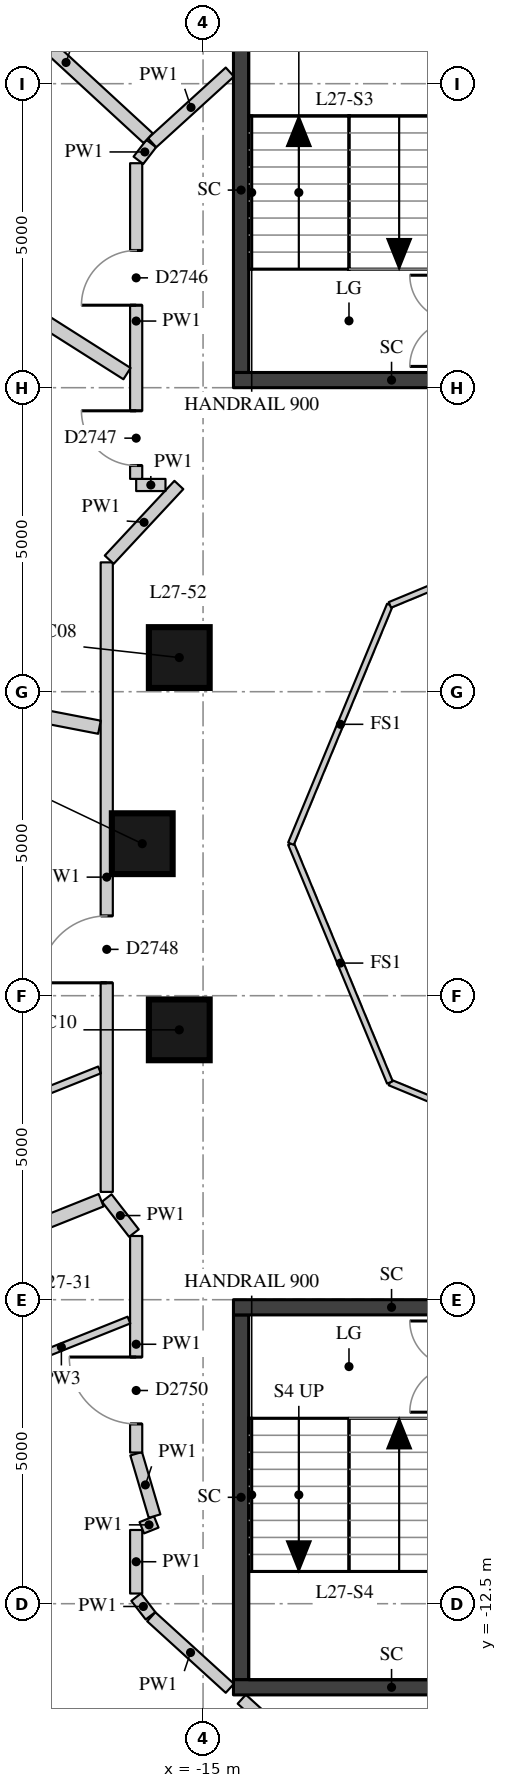
"""IFC4 building model, lengths in metres.
Left out: names, types, materials, properties, quantities, classifications, styles, units other than length and angle.
Written with IfcOpenShell. Run it as: python <this file> out.ifc"""

import sys

from ifc_helpers import new_model, si_unit, direction, frame, frame_2d, origin, origin_2d, place, context, subcontext, project, spatial, rectangle, extrude, element, fill, save


model = new_model("IFC4")
c1 = context("Model", 3, precision=1e-05, world=origin(), true_north=direction((0.0, 1.0)))
c2 = subcontext(c1, "Body", "Model", "MODEL_VIEW")
j1 = project(units=[si_unit("LENGTHUNIT", "METRE"), si_unit("PLANEANGLEUNIT", "RADIAN")], contexts=[c1])
p1 = place(None, origin())
s1 = spatial("IfcSite", under=j1, at=p1, CompositionType="ELEMENT")
p2 = place(p1, origin())
s2 = spatial("IfcBuilding", under=s1, at=p2, CompositionType="ELEMENT")
p3 = place(p2, frame((0.0, 0.0, 98.8)))
s3 = spatial("IfcBuildingStorey", under=s2, at=p3, CompositionType="ELEMENT", Elevation=98.8)
for number, where, z_axis, x_axis in (
    (1, (-15.391, 3.062, 0.0), (0.0, 0.0, 1.0), (1.0, 0.0, 0.0)),
    (2, (-16.0, 0.0, 0.0), (0.0, 0.0, 1.0), (1.0, 0.0, 0.0)),
    (3, (-15.391, -3.062, 0.0), (0.0, 0.0, 1.0), (1.0, 0.0, 0.0)),
):
    element("IfcColumn", number, at=place(p3, frame(where, z_axis=z_axis, x_axis=x_axis)), inside=s3, PredefinedType="COLUMN", context=c2, shape_type="SweptSolid", body=[
        extrude(rectangle(XDim=1.0, YDim=1.0, at=origin_2d()), origin(), (0.0, 0.0, 1.0), 3.3),
    ])
p4 = place(p3, frame((-14.375, 7.75, -0.28), z_axis=(0.0, 0.0, 1.0), x_axis=(0.0, 1.0, 0.0)))
e4 = element("IfcWall", 4, at=p4, inside=s3, PredefinedType="SHEAR", context=c2, shape_type="SweptSolid", body=[
    extrude(rectangle(XDim=6.0, YDim=0.25, at=frame_2d((3.0, 0.0))), origin(), (0.0, 0.0, 1.0), 3.3),
])
p5 = place(p3, frame((-14.5, 7.625, -0.28), z_axis=(0.0, 0.0, 1.0), x_axis=(1.0, 0.0, 0.0)))
e5 = element("IfcWall", 5, at=p5, inside=s3, PredefinedType="SHEAR", context=c2, shape_type="SweptSolid", body=[
    extrude(rectangle(XDim=5.2, YDim=0.25, at=frame_2d((2.6, 0.0))), origin(), (0.0, 0.0, 1.0), 3.3),
])
p6 = place(p3, frame((-14.375, -13.75, -0.28), z_axis=(0.0, 0.0, 1.0), x_axis=(0.0, 1.0, 0.0)))
e6 = element("IfcWall", 6, at=p6, inside=s3, PredefinedType="SHEAR", context=c2, shape_type="SweptSolid", body=[
    extrude(rectangle(XDim=6.0, YDim=0.25, at=frame_2d((3.0, 0.0))), origin(), (0.0, 0.0, 1.0), 3.3),
])
for number, where, z_axis, x_axis in (
    (7, (-14.5, -7.625, -0.28), (0.0, 0.0, 1.0), (1.0, 0.0, 0.0)),
    (8, (-14.5, -13.875, -0.28), (0.0, 0.0, 1.0), (1.0, 0.0, 0.0)),
):
    element("IfcWall", number, at=place(p3, frame(where, z_axis=z_axis, x_axis=x_axis)), inside=s3, PredefinedType="SHEAR", context=c2, shape_type="SweptSolid", body=[
        extrude(rectangle(XDim=5.2, YDim=0.25, at=frame_2d((2.6, 0.0))), origin(), (0.0, 0.0, 1.0), 3.3),
    ])
p7 = place(p3, frame((-14.56, -13.891, 0.0), z_axis=(0.0, 0.0, 1.0), x_axis=(-0.739440483737, 0.673221932954, 0.0)))
e9 = element("IfcWall", 9, at=p7, inside=s3, PredefinedType="PARTITIONING", context=c2, shape_type="SweptSolid", body=[
    extrude(rectangle(XDim=1.748, YDim=0.2, at=frame_2d((0.874, 0.0))), origin(), (0.0, 0.0, 1.0), 3.02),
])
p8 = place(p3, frame((-15.864, -12.699, 0.0), z_axis=(0.0, 0.0, 1.0), x_axis=(-0.61004607296, 0.792365943782, 0.0)))
e10 = element("IfcWall", 10, at=p8, inside=s3, PredefinedType="PARTITIONING", context=c2, shape_type="SweptSolid", body=[
    extrude(rectangle(XDim=0.387, YDim=0.2, at=frame_2d((0.193, 0.0))), origin(), (0.0, 0.0, 1.0), 3.02),
])
p9 = place(p3, frame((-16.1, -12.332, 0.0), z_axis=(0.0, 0.0, 1.0), x_axis=(0.0, 1.0, 0.0)))
e11 = element("IfcWall", 11, at=p9, inside=s3, PredefinedType="PARTITIONING", context=c2, shape_type="SweptSolid", body=[
    extrude(rectangle(XDim=1.045, YDim=0.2, at=frame_2d((0.522, 0.0))), origin(), (0.0, 0.0, 1.0), 3.02),
])
p10 = place(p3, frame((-16.007, -11.251, 0.0), z_axis=(0.0, 0.0, 1.0), x_axis=(0.928016011931, 0.372540308691, 0.0)))
e12 = element("IfcWall", 12, at=p10, inside=s3, PredefinedType="PARTITIONING", context=c2, shape_type="SweptSolid", body=[
    extrude(rectangle(XDim=0.256, YDim=0.2, at=frame_2d((0.128, 0.0))), origin(), (0.0, 0.0, 1.0), 3.02),
])
p11 = place(p3, frame((-15.798, -11.059, 0.0), z_axis=(0.0, 0.0, 1.0), x_axis=(-0.282883185669, 0.959154368841, 0.0)))
e13 = element("IfcWall", 13, at=p11, inside=s3, PredefinedType="PARTITIONING", context=c2, shape_type="SweptSolid", body=[
    extrude(rectangle(XDim=1.069, YDim=0.2, at=frame_2d((0.535, 0.0))), origin(), (0.0, 0.0, 1.0), 3.02),
])
p12 = place(p3, frame((-16.1, -10.013, 0.0), z_axis=(0.0, 0.0, 1.0), x_axis=(0.0, 1.0, 0.0)))
e14 = element("IfcWall", 14, at=p12, inside=s3, PredefinedType="PARTITIONING", context=c2, shape_type="SweptSolid", body=[
    extrude(rectangle(XDim=3.561, YDim=0.2, at=frame_2d((1.781, 0.0))), origin(), (0.0, 0.0, 1.0), 3.02),
])
p13 = place(p12, frame((0.47, 0.0, 0.0)))
e15 = element("IfcOpeningElement", 15, at=p13, cuts=e14, PredefinedType="OPENING", context=c2, shape_type="SweptSolid", body=[
    extrude(rectangle(XDim=1.1, YDim=2.1, at=frame_2d((0.55, 1.05))), frame((0.0, 0.11, 0.0), z_axis=(0.0, -1.0, 0.0), x_axis=(1.0, 0.0, 0.0)), (0.0, 0.0, 1.0), 0.22),
])
p14 = place(p3, frame((-16.137, -6.405, 0.0), z_axis=(0.0, 0.0, 1.0), x_axis=(-0.612388914667, 0.790556650211, 0.0)))
e16 = element("IfcWall", 16, at=p14, inside=s3, PredefinedType="PARTITIONING", context=c2, shape_type="SweptSolid", body=[
    extrude(rectangle(XDim=0.73, YDim=0.2, at=frame_2d((0.365, 0.0))), origin(), (0.0, 0.0, 1.0), 3.02),
])
p15 = place(p3, frame((-16.584, -5.727, 0.0), z_axis=(0.0, 0.0, 1.0), x_axis=(0.0, 1.0, 0.0)))
e17 = element("IfcWall", 17, at=p15, inside=s3, PredefinedType="PARTITIONING", context=c2, shape_type="SweptSolid", body=[
    extrude(rectangle(XDim=10.354, YDim=0.2, at=frame_2d((5.177, 0.0))), origin(), (0.0, 0.0, 1.0), 3.02),
])
p16 = place(p15, frame((3.439, 0.0, 0.0)))
e18 = element("IfcOpeningElement", 18, at=p16, cuts=e17, PredefinedType="OPENING", context=c2, shape_type="SweptSolid", body=[
    extrude(rectangle(XDim=1.1, YDim=2.1, at=frame_2d((0.55, 1.05))), frame((0.0, 0.11, 0.0), z_axis=(0.0, -1.0, 0.0), x_axis=(1.0, 0.0, 0.0)), (0.0, 0.0, 1.0), 0.22),
])
p17 = place(p3, frame((-16.543, 4.671, 0.0), z_axis=(0.0, 0.0, 1.0), x_axis=(0.681815766934, 0.731523929861, 0.0)))
e19 = element("IfcWall", 19, at=p17, inside=s3, PredefinedType="PARTITIONING", context=c2, shape_type="SweptSolid", body=[
    extrude(rectangle(XDim=1.68, YDim=0.2, at=frame_2d((0.84, 0.0))), origin(), (0.0, 0.0, 1.0), 3.02),
])
p18 = place(p3, frame((-15.618, 5.9, 0.0), z_axis=(0.0, 0.0, 1.0), x_axis=(-1.0, 0.0, 0.0)))
e20 = element("IfcWall", 20, at=p18, inside=s3, PredefinedType="PARTITIONING", context=c2, shape_type="SweptSolid", body=[
    extrude(rectangle(XDim=0.482, YDim=0.2, at=frame_2d((0.241, 0.0))), origin(), (0.0, 0.0, 1.0), 3.02),
])
p19 = place(p3, frame((-16.1, 6.0, 0.0), z_axis=(0.0, 0.0, 1.0), x_axis=(0.0, 1.0, 0.0)))
e21 = element("IfcWall", 21, at=p19, inside=s3, PredefinedType="PARTITIONING", context=c2, shape_type="SweptSolid", body=[
    extrude(rectangle(XDim=5.192, YDim=0.2, at=frame_2d((2.596, 0.0))), origin(), (0.0, 0.0, 1.0), 3.02),
])
p20 = place(p19, frame((2.857, 0.0, 0.0)))
e22 = element("IfcOpeningElement", 22, at=p20, cuts=e21, PredefinedType="OPENING", context=c2, shape_type="SweptSolid", body=[
    extrude(rectangle(XDim=0.9, YDim=2.1, at=frame_2d((0.45, 1.05))), frame((0.0, 0.11, 0.0), z_axis=(0.0, -1.0, 0.0), x_axis=(1.0, 0.0, 0.0)), (0.0, 0.0, 1.0), 0.22),
])
p21 = place(p19, frame((0.22, 0.0, 0.0)))
e23 = element("IfcOpeningElement", 23, at=p21, cuts=e21, PredefinedType="OPENING", context=c2, shape_type="SweptSolid", body=[
    extrude(rectangle(XDim=0.9, YDim=2.1, at=frame_2d((0.45, 1.05))), frame((0.0, 0.11, 0.0), z_axis=(0.0, -1.0, 0.0), x_axis=(1.0, 0.0, 0.0)), (0.0, 0.0, 1.0), 0.22),
])
p22 = place(p3, frame((-16.063, 11.24, 0.0), z_axis=(0.0, 0.0, 1.0), x_axis=(0.609744747854, 0.792597844096, 0.0)))
e24 = element("IfcWall", 24, at=p22, inside=s3, PredefinedType="PARTITIONING", context=c2, shape_type="SweptSolid", body=[
    extrude(rectangle(XDim=0.347, YDim=0.2, at=frame_2d((0.174, 0.0))), origin(), (0.0, 0.0, 1.0), 3.02),
])
p23 = place(p3, frame((-15.837, 11.528, 0.0), z_axis=(0.0, 0.0, 1.0), x_axis=(0.739402681643, 0.673263450946, 0.0)))
e25 = element("IfcWall", 25, at=p23, inside=s3, PredefinedType="PARTITIONING", context=c2, shape_type="SweptSolid", body=[
    extrude(rectangle(XDim=1.728, YDim=0.2, at=frame_2d((0.864, 0.0))), origin(), (0.0, 0.0, 1.0), 3.02),
])
p24 = place(p3, frame((-13.24, -15.093, 0.0), z_axis=(0.0, 0.0, 1.0), x_axis=(-0.739438095557, 0.673224556028, 0.0)))
e26 = element("IfcWall", 26, at=p24, inside=s3, PredefinedType="PARTITIONING", context=c2, shape_type="SweptSolid", body=[
    extrude(rectangle(XDim=1.519, YDim=0.2, at=frame_2d((0.76, 0.0))), origin(), (0.0, 0.0, 1.0), 3.02),
])
p25 = place(p3, frame((-18.604, 14.094, 0.0), z_axis=(0.0, 0.0, 1.0), x_axis=(0.73529495628, -0.677747244383, 0.0)))
e27 = element("IfcWall", 27, at=p25, inside=s3, PredefinedType="PARTITIONING", context=c2, shape_type="SweptSolid", body=[
    extrude(rectangle(XDim=3.674, YDim=0.22, at=frame_2d((1.837, 0.0))), origin(), (0.0, 0.0, 1.0), 3.02),
])
p26 = place(p3, frame((-21.126, 10.823, 0.0), z_axis=(0.0, 0.0, 1.0), x_axis=(0.844518840625, -0.535525842355, 0.0)))
e28 = element("IfcWall", 28, at=p26, inside=s3, PredefinedType="PARTITIONING", context=c2, shape_type="SweptSolid", body=[
    extrude(rectangle(XDim=5.773, YDim=0.22, at=frame_2d((2.887, 0.0))), origin(), (0.0, 0.0, 1.0), 3.02),
])
p27 = place(p3, frame((-22.793, 3.095, 0.0), z_axis=(0.0, 0.0, 1.0), x_axis=(0.98175994641, -0.190124715976, 0.0)))
e29 = element("IfcWall", 29, at=p27, inside=s3, PredefinedType="PARTITIONING", context=c2, shape_type="SweptSolid", body=[
    extrude(rectangle(XDim=6.202, YDim=0.22, at=frame_2d((3.101, 0.0))), origin(), (0.0, 0.0, 1.0), 2.47),
])
p28 = place(p3, frame((-21.736, -7.887, 0.0), z_axis=(0.0, 0.0, 1.0), x_axis=(0.928513770625, 0.371297963583, 0.0)))
e30 = element("IfcWall", 30, at=p28, inside=s3, PredefinedType="PARTITIONING", context=c2, shape_type="SweptSolid", body=[
    extrude(rectangle(XDim=5.448, YDim=0.22, at=frame_2d((2.724, 0.0))), origin(), (0.0, 0.0, 1.0), 3.02),
])
p29 = place(p3, frame((-16.703, -3.721, 0.0), z_axis=(0.0, 0.0, 1.0), x_axis=(-0.928539725362, -0.371233051362, 0.0)))
e31 = element("IfcWall", 31, at=p29, inside=s3, PredefinedType="PARTITIONING", context=c2, shape_type="SweptSolid", body=[
    extrude(rectangle(XDim=3.472, YDim=0.12, at=frame_2d((1.736, 0.0))), origin(), (0.0, 0.0, 1.0), 3.02),
])
p30 = place(p3, frame((-16.219, -7.835, 0.0), z_axis=(0.0, 0.0, 1.0), x_axis=(-0.928532951542, -0.371249993806, 0.0)))
e32 = element("IfcWall", 32, at=p30, inside=s3, PredefinedType="PARTITIONING", context=c2, shape_type="SweptSolid", body=[
    extrude(rectangle(XDim=2.394, YDim=0.12, at=frame_2d((1.197, 0.0))), origin(), (0.0, 0.0, 1.0), 3.02),
])
for number, where, z_axis, x_axis in (
    (33, (-8.0, -5.554, 0.0), (0.0, 0.0, 1.0), (-0.924, 0.383, 0.0)),
    (34, (-11.927, -3.927, 0.0), (0.0, 0.0, 1.0), (-0.383, 0.924, 0.0)),
    (35, (-13.554, 0.0, 0.0), (0.0, 0.0, 1.0), (0.383, 0.924, 0.0)),
    (36, (-11.927, 3.927, 0.0), (0.0, 0.0, 1.0), (0.924, 0.383, 0.0)),
):
    element("IfcWall", number, at=place(p3, frame(where, z_axis=z_axis, x_axis=x_axis)), inside=s3, PredefinedType="PARTITIONING", context=c2, shape_type="SweptSolid", body=[
        extrude(rectangle(XDim=4.251, YDim=0.1, at=frame_2d((2.125, 0.0))), origin(), (0.0, 0.0, 1.0), 3.02),
    ])
p31 = place(p20, origin())
e37 = element("IfcDoor", 37, at=p31, inside=s3, OperationType="SINGLE_SWING_LEFT", PredefinedType="DOOR", context=c2, shape_type="SweptSolid", body=[
    extrude(rectangle(XDim=0.9, YDim=2.1, at=frame_2d((0.45, 1.05))), frame((0.0, 0.025, 0.0), z_axis=(0.0, -1.0, 0.0), x_axis=(1.0, 0.0, 0.0)), (0.0, 0.0, 1.0), 0.05),
])
fill(e22, e37)
p32 = place(p21, origin())
e38 = element("IfcDoor", 38, at=p32, inside=s3, OperationType="SINGLE_SWING_RIGHT", PredefinedType="DOOR", context=c2, shape_type="SweptSolid", body=[
    extrude(rectangle(XDim=0.9, YDim=2.1, at=frame_2d((0.45, 1.05))), frame((0.0, 0.025, 0.0), z_axis=(0.0, -1.0, 0.0), x_axis=(1.0, 0.0, 0.0)), (0.0, 0.0, 1.0), 0.05),
])
fill(e23, e38)
p33 = place(p16, origin())
e39 = element("IfcDoor", 39, at=p33, inside=s3, OperationType="SINGLE_SWING_LEFT", PredefinedType="DOOR", context=c2, shape_type="SweptSolid", body=[
    extrude(rectangle(XDim=1.1, YDim=2.1, at=frame_2d((0.55, 1.05))), frame((0.0, 0.025, 0.0), z_axis=(0.0, -1.0, 0.0), x_axis=(1.0, 0.0, 0.0)), (0.0, 0.0, 1.0), 0.05),
])
fill(e18, e39)
p34 = place(p13, origin())
e40 = element("IfcDoor", 40, at=p34, inside=s3, OperationType="SINGLE_SWING_RIGHT", PredefinedType="DOOR", context=c2, shape_type="SweptSolid", body=[
    extrude(rectangle(XDim=1.1, YDim=2.1, at=frame_2d((0.55, 1.05))), frame((0.0, 0.025, 0.0), z_axis=(0.0, -1.0, 0.0), x_axis=(1.0, 0.0, 0.0)), (0.0, 0.0, 1.0), 0.05),
])
fill(e15, e40)
save(model, sys.argv[1])
